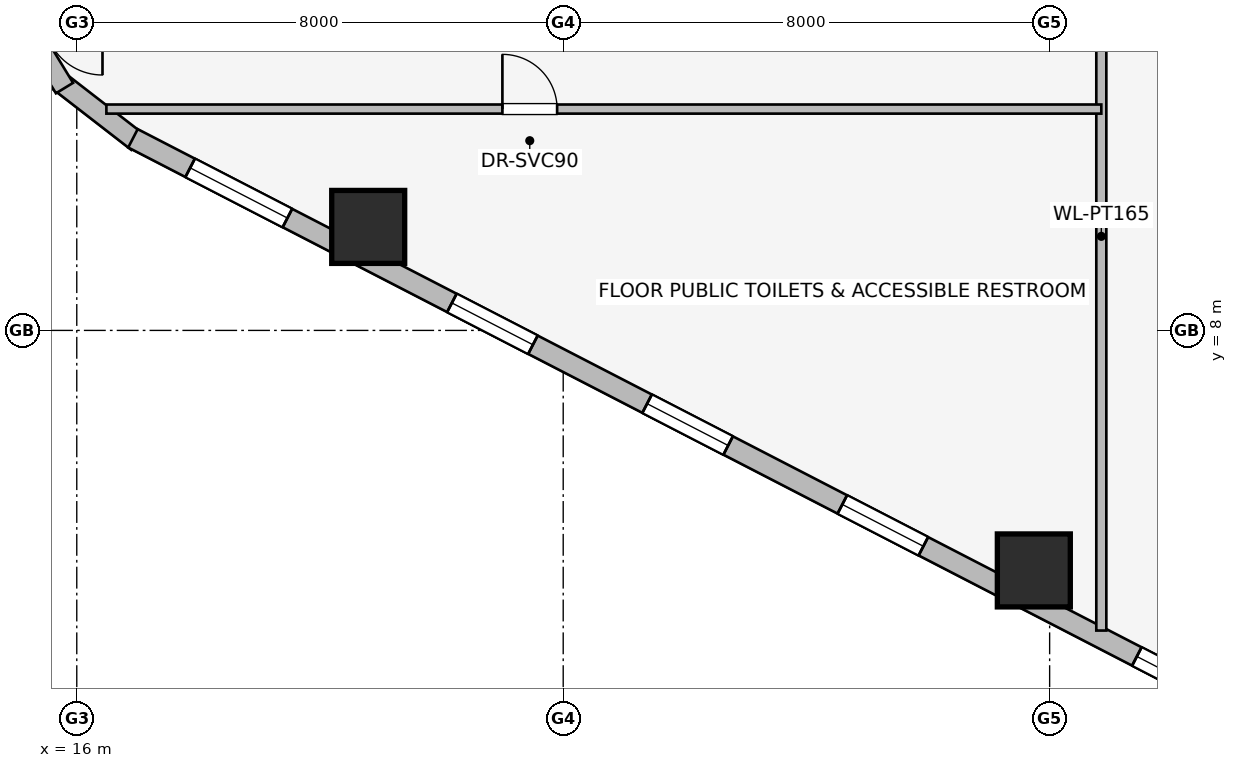
"""IFC4 building model, lengths in metres.
Left out: names, types, materials, properties, quantities, classifications, styles, units other than length and angle.
Written with IfcOpenShell. Run it as: python <this file> out.ifc"""

import sys

from ifc_helpers import new_model, si_unit, direction, frame, frame_2d, origin, origin_2d, place, context, subcontext, project, spatial, rectangle, extrude, element, fill, save


model = new_model("IFC4")
c1 = context("Model", 3, precision=1e-05, world=origin(), true_north=direction((0.0, 1.0)))
c2 = subcontext(c1, "Body", "Model", "MODEL_VIEW")
j1 = project(units=[si_unit("LENGTHUNIT", "METRE"), si_unit("PLANEANGLEUNIT", "RADIAN")], contexts=[c1])
p1 = place(None, origin())
s1 = spatial("IfcSite", under=j1, at=p1, CompositionType="ELEMENT")
p2 = place(p1, origin())
s2 = spatial("IfcBuilding", under=s1, at=p2, CompositionType="ELEMENT")
p3 = place(p2, frame((0.0, 0.0, 85.4)))
s3 = spatial("IfcBuildingStorey", under=s2, at=p3, CompositionType="ELEMENT", Elevation=85.4)
for number, where, z_axis, x_axis in (
    (1, (20.793, 9.702, 0.0), (0.0, 0.0, 1.0), (1.0, 0.0, 0.0)),
    (2, (31.74, 4.053, 0.0), (0.0, 0.0, 1.0), (1.0, 0.0, 0.0)),
):
    element("IfcColumn", number, at=place(p3, frame(where, z_axis=z_axis, x_axis=x_axis)), inside=s3, PredefinedType="COLUMN", context=c2, shape_type="SweptSolid", body=[
        extrude(rectangle(XDim=1.2, YDim=1.2, at=origin_2d()), origin(), (0.0, 0.0, 1.0), 3.65),
    ])
p4 = place(p3, frame((16.998, 11.099, 0.0), z_axis=(0.0, 0.0, 1.0), x_axis=(-0.790691856293, 0.61221433207, 0.0)))
e3 = element("IfcWall", 3, at=p4, inside=s3, PredefinedType="STANDARD", context=c2, shape_type="SweptSolid", body=[
    extrude(rectangle(XDim=1.676, YDim=0.33, at=frame_2d((0.838, 0.0))), origin(), (0.0, 0.0, 1.0), 3.39),
])
p5 = place(p3, frame((15.798, 11.985, 0.0), z_axis=(0.0, 0.0, 1.0), x_axis=(-0.520584129191, 0.853810379671, 0.0)))
e4 = element("IfcWall", 4, at=p5, inside=s3, PredefinedType="STANDARD", context=c2, shape_type="SweptSolid", body=[
    extrude(rectangle(XDim=1.677, YDim=0.33, at=frame_2d((0.838, 0.0))), origin(), (0.0, 0.0, 1.0), 3.39),
])
p6 = place(p3, frame((35.169, 1.743, 0.0), z_axis=(0.0, 0.0, 1.0), x_axis=(-0.888634413993, 0.458616264721, 0.0)))
e5 = element("IfcWall", 5, at=p6, inside=s3, PredefinedType="STANDARD", context=c2, shape_type="SweptSolid", body=[
    extrude(rectangle(XDim=20.531, YDim=0.34, at=frame_2d((10.266, 0.0))), origin(), (0.0, 0.0, 1.0), 2.684),
])
p7 = place(p6, frame((0.902, 0.0, 0.75)))
e6 = element("IfcOpeningElement", 6, at=p7, cuts=e5, PredefinedType="OPENING", context=c2, shape_type="SweptSolid", body=[
    extrude(rectangle(XDim=1.05, YDim=1.4, at=frame_2d((0.525, 0.7))), frame((0.0, 0.18, 0.0), z_axis=(0.0, -1.0, 0.0), x_axis=(1.0, 0.0, 0.0)), (0.0, 0.0, 1.0), 0.36),
])
p8 = place(p6, frame((5.903, 0.0, 0.75)))
e7 = element("IfcOpeningElement", 7, at=p8, cuts=e5, PredefinedType="OPENING", context=c2, shape_type="SweptSolid", body=[
    extrude(rectangle(XDim=1.5, YDim=1.5, at=frame_2d((0.75, 0.75))), frame((0.0, 0.18, 0.0), z_axis=(0.0, -1.0, 0.0), x_axis=(1.0, 0.0, 0.0)), (0.0, 0.0, 1.0), 0.36),
])
p9 = place(p6, frame((9.516, 0.0, 0.75)))
e8 = element("IfcOpeningElement", 8, at=p9, cuts=e5, PredefinedType="OPENING", context=c2, shape_type="SweptSolid", body=[
    extrude(rectangle(XDim=1.5, YDim=1.5, at=frame_2d((0.75, 0.75))), frame((0.0, 0.18, 0.0), z_axis=(0.0, -1.0, 0.0), x_axis=(1.0, 0.0, 0.0)), (0.0, 0.0, 1.0), 0.36),
])
p10 = place(p6, frame((13.129, 0.0, 0.75)))
e9 = element("IfcOpeningElement", 9, at=p10, cuts=e5, PredefinedType="OPENING", context=c2, shape_type="SweptSolid", body=[
    extrude(rectangle(XDim=1.5, YDim=1.5, at=frame_2d((0.75, 0.75))), frame((0.0, 0.18, 0.0), z_axis=(0.0, -1.0, 0.0), x_axis=(1.0, 0.0, 0.0)), (0.0, 0.0, 1.0), 0.36),
])
p11 = place(p6, frame((17.673, 0.0, 0.75)))
e10 = element("IfcOpeningElement", 10, at=p11, cuts=e5, PredefinedType="OPENING", context=c2, shape_type="SweptSolid", body=[
    extrude(rectangle(XDim=1.8, YDim=1.5, at=frame_2d((0.9, 0.75))), frame((0.0, 0.18, 0.0), z_axis=(0.0, -1.0, 0.0), x_axis=(1.0, 0.0, 0.0)), (0.0, 0.0, 1.0), 0.36),
])
p12 = place(p3, frame((32.85, 3.064, 0.0), z_axis=(0.0, 0.0, 1.0), x_axis=(0.0, 1.0, 0.0)))
e11 = element("IfcWall", 11, at=p12, inside=s3, PredefinedType="PARTITIONING", context=c2, shape_type="SweptSolid", body=[
    extrude(rectangle(XDim=12.966, YDim=0.165, at=frame_2d((6.483, 0.0))), origin(), (0.0, 0.0, 1.0), 3.39),
])
p13 = place(p3, frame((16.487, 11.64, 0.0), z_axis=(0.0, 0.0, 1.0), x_axis=(1.0, 0.0, 0.0)))
e12 = element("IfcWall", 12, at=p13, inside=s3, PredefinedType="PARTITIONING", context=c2, shape_type="SweptSolid", body=[
    extrude(rectangle(XDim=16.363, YDim=0.15, at=frame_2d((8.182, 0.0))), origin(), (0.0, 0.0, 1.0), 3.39),
])
p14 = place(p13, frame((6.513, 0.0, 0.0)))
e13 = element("IfcOpeningElement", 13, at=p14, cuts=e12, PredefinedType="OPENING", context=c2, shape_type="SweptSolid", body=[
    extrude(rectangle(XDim=0.9, YDim=2.0, at=frame_2d((0.45, 1.0))), frame((0.0, 0.085, 0.0), z_axis=(0.0, -1.0, 0.0), x_axis=(1.0, 0.0, 0.0)), (0.0, 0.0, 1.0), 0.17),
])
p15 = place(p7, origin())
e14 = element("IfcWindow", 14, at=p15, inside=s3, PartitioningType="SINGLE_PANEL", PredefinedType="WINDOW", context=c2, shape_type="SweptSolid", body=[
    extrude(rectangle(XDim=1.05, YDim=1.4, at=frame_2d((0.525, 0.7))), frame((0.0, 0.03, 0.0), z_axis=(0.0, -1.0, 0.0), x_axis=(1.0, 0.0, 0.0)), (0.0, 0.0, 1.0), 0.06),
])
fill(e6, e14)
p16 = place(p8, origin())
e15 = element("IfcWindow", 15, at=p16, inside=s3, PartitioningType="SINGLE_PANEL", PredefinedType="WINDOW", context=c2, shape_type="SweptSolid", body=[
    extrude(rectangle(XDim=1.5, YDim=1.5, at=frame_2d((0.75, 0.75))), frame((0.0, 0.03, 0.0), z_axis=(0.0, -1.0, 0.0), x_axis=(1.0, 0.0, 0.0)), (0.0, 0.0, 1.0), 0.06),
])
fill(e7, e15)
p17 = place(p9, origin())
e16 = element("IfcWindow", 16, at=p17, inside=s3, PartitioningType="SINGLE_PANEL", PredefinedType="WINDOW", context=c2, shape_type="SweptSolid", body=[
    extrude(rectangle(XDim=1.5, YDim=1.5, at=frame_2d((0.75, 0.75))), frame((0.0, 0.03, 0.0), z_axis=(0.0, -1.0, 0.0), x_axis=(1.0, 0.0, 0.0)), (0.0, 0.0, 1.0), 0.06),
])
fill(e8, e16)
p18 = place(p10, origin())
e17 = element("IfcWindow", 17, at=p18, inside=s3, PartitioningType="SINGLE_PANEL", PredefinedType="WINDOW", context=c2, shape_type="SweptSolid", body=[
    extrude(rectangle(XDim=1.5, YDim=1.5, at=frame_2d((0.75, 0.75))), frame((0.0, 0.03, 0.0), z_axis=(0.0, -1.0, 0.0), x_axis=(1.0, 0.0, 0.0)), (0.0, 0.0, 1.0), 0.06),
])
fill(e9, e17)
p19 = place(p11, origin())
e18 = element("IfcWindow", 18, at=p19, inside=s3, PartitioningType="SINGLE_PANEL", PredefinedType="WINDOW", context=c2, shape_type="SweptSolid", body=[
    extrude(rectangle(XDim=1.8, YDim=1.5, at=frame_2d((0.9, 0.75))), frame((0.0, 0.03, 0.0), z_axis=(0.0, -1.0, 0.0), x_axis=(1.0, 0.0, 0.0)), (0.0, 0.0, 1.0), 0.06),
])
fill(e10, e18)
p20 = place(p14, origin())
e19 = element("IfcDoor", 19, at=p20, inside=s3, OperationType="SINGLE_SWING_LEFT", PredefinedType="DOOR", context=c2, shape_type="SweptSolid", body=[
    extrude(rectangle(XDim=0.9, YDim=2.0, at=frame_2d((0.45, 1.0))), frame((0.0, 0.025, 0.0), z_axis=(0.0, -1.0, 0.0), x_axis=(1.0, 0.0, 0.0)), (0.0, 0.0, 1.0), 0.05),
])
fill(e13, e19)
save(model, sys.argv[1])
